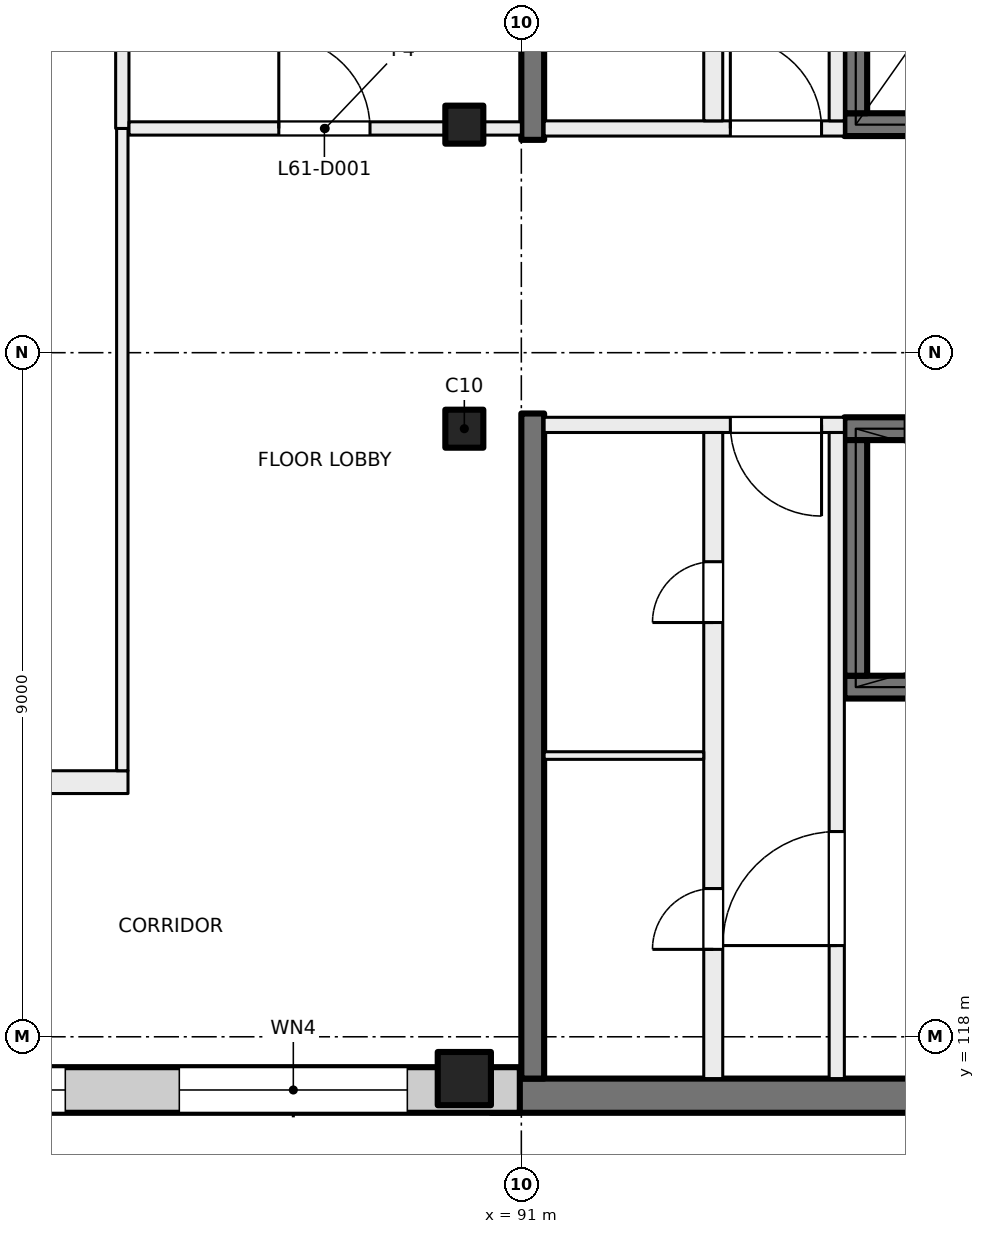
"""IFC4 building model, lengths in metres.
Left out: names, types, materials, properties, quantities, classifications, styles, units other than length and angle.
Written with IfcOpenShell. Run it as: python <this file> out.ifc"""

import sys

from ifc_helpers import new_model, si_unit, direction, frame, frame_2d, origin, origin_2d, place, context, subcontext, project, spatial, rectangle, extrude, element, fill, save


model = new_model("IFC4")
c1 = context("Model", 3, precision=1e-05, world=origin(), true_north=direction((0.0, 1.0)))
c2 = subcontext(c1, "Body", "Model", "MODEL_VIEW")
j1 = project(units=[si_unit("LENGTHUNIT", "METRE"), si_unit("PLANEANGLEUNIT", "RADIAN")], contexts=[c1])
p1 = place(None, origin())
s1 = spatial("IfcSite", under=j1, at=p1, CompositionType="ELEMENT")
p2 = place(p1, origin())
s2 = spatial("IfcBuilding", under=s1, at=p2, CompositionType="ELEMENT")
p3 = place(p2, frame((0.0, 0.0, 257.5)))
s3 = spatial("IfcBuildingStorey", under=s2, at=p3, CompositionType="ELEMENT", Elevation=257.5)
for number, where, z_axis, x_axis in (
    (1, (90.25, 130.0, 0.0), (0.0, 0.0, 1.0), (1.0, 0.0, 0.0)),
    (2, (90.25, 126.0, 0.0), (0.0, 0.0, 1.0), (1.0, 0.0, 0.0)),
):
    element("IfcColumn", number, at=place(p3, frame(where, z_axis=z_axis, x_axis=x_axis)), inside=s3, PredefinedType="COLUMN", context=c2, shape_type="SweptSolid", body=[
        extrude(rectangle(XDim=0.5, YDim=0.5, at=origin_2d()), origin(), (0.0, 0.0, 1.0), 4.0),
    ])
p4 = place(p3, frame((90.25, 117.45, 0.0), z_axis=(0.0, 0.0, 1.0), x_axis=(1.0, 0.0, 0.0)))
e3 = element("IfcColumn", 3, at=p4, inside=s3, PredefinedType="COLUMN", context=c2, shape_type="SweptSolid", body=[
    extrude(rectangle(XDim=0.7, YDim=0.7, at=origin_2d()), origin(), (0.0, 0.0, 1.0), 4.0),
])
p5 = place(p3, frame((99.6, 117.225, 0.0), z_axis=(0.0, 0.0, 1.0), x_axis=(-1.0, 0.0, 0.0)))
e4 = element("IfcWall", 4, at=p5, inside=s3, PredefinedType="SHEAR", context=c2, shape_type="SweptSolid", body=[
    extrude(rectangle(XDim=9.0, YDim=0.45, at=frame_2d((4.5, 0.0))), origin(), (0.0, 0.0, 1.0), 4.0),
])
p6 = place(p3, frame((107.55, 130.0, 0.0), z_axis=(0.0, 0.0, 1.0), x_axis=(-1.0, 0.0, 0.0)))
e5 = element("IfcWall", 5, at=p6, inside=s3, PredefinedType="SHEAR", context=c2, shape_type="SweptSolid", body=[
    extrude(rectangle(XDim=12.3, YDim=0.3, at=frame_2d((6.15, 0.0))), origin(), (0.0, 0.0, 1.0), 4.0),
])
p7 = place(p6, frame((0.95, 0.0, 0.0)))
e6 = element("IfcOpeningElement", 6, at=p7, cuts=e5, PredefinedType="OPENING", context=c2, shape_type="SweptSolid", body=[
    extrude(rectangle(XDim=0.8, YDim=2.1, at=frame_2d((0.4, 1.05))), frame((0.0, 0.16, 0.0), z_axis=(0.0, -1.0, 0.0), x_axis=(1.0, 0.0, 0.0)), (0.0, 0.0, 1.0), 0.32),
])
p8 = place(p6, frame((5.75, 0.0, 0.0)))
e7 = element("IfcOpeningElement", 7, at=p8, cuts=e5, PredefinedType="OPENING", context=c2, shape_type="SweptSolid", body=[
    extrude(rectangle(XDim=0.8, YDim=2.1, at=frame_2d((0.4, 1.05))), frame((0.0, 0.16, 0.0), z_axis=(0.0, -1.0, 0.0), x_axis=(1.0, 0.0, 0.0)), (0.0, 0.0, 1.0), 0.32),
])
p9 = place(p3, frame((95.4, 133.25, 0.0), z_axis=(0.0, 0.0, 1.0), x_axis=(0.0, -1.0, 0.0)))
e8 = element("IfcWall", 8, at=p9, inside=s3, PredefinedType="SHEAR", context=c2, shape_type="SweptSolid", body=[
    extrude(rectangle(XDim=3.1, YDim=0.3, at=frame_2d((1.55, 0.0))), origin(), (0.0, 0.0, 1.0), 4.0),
])
p10 = place(p3, frame((107.55, 126.0, 0.0), z_axis=(0.0, 0.0, 1.0), x_axis=(-1.0, 0.0, 0.0)))
e9 = element("IfcWall", 9, at=p10, inside=s3, PredefinedType="SHEAR", context=c2, shape_type="SweptSolid", body=[
    extrude(rectangle(XDim=12.3, YDim=0.3, at=frame_2d((6.15, 0.0))), origin(), (0.0, 0.0, 1.0), 4.0),
])
p11 = place(p10, frame((0.8, 0.0, 0.0)))
e10 = element("IfcOpeningElement", 10, at=p11, cuts=e9, PredefinedType="OPENING", context=c2, shape_type="SweptSolid", body=[
    extrude(rectangle(XDim=1.1, YDim=2.1, at=frame_2d((0.55, 1.05))), frame((0.0, 0.16, 0.0), z_axis=(0.0, -1.0, 0.0), x_axis=(1.0, 0.0, 0.0)), (0.0, 0.0, 1.0), 0.32),
])
p12 = place(p10, frame((3.2, 0.0, 0.0)))
e11 = element("IfcOpeningElement", 11, at=p12, cuts=e9, PredefinedType="OPENING", context=c2, shape_type="SweptSolid", body=[
    extrude(rectangle(XDim=1.1, YDim=2.1, at=frame_2d((0.55, 1.05))), frame((0.0, 0.16, 0.0), z_axis=(0.0, -1.0, 0.0), x_axis=(1.0, 0.0, 0.0)), (0.0, 0.0, 1.0), 0.32),
])
p13 = place(p10, frame((5.6, 0.0, 0.0)))
e12 = element("IfcOpeningElement", 12, at=p13, cuts=e9, PredefinedType="OPENING", context=c2, shape_type="SweptSolid", body=[
    extrude(rectangle(XDim=1.1, YDim=2.1, at=frame_2d((0.55, 1.05))), frame((0.0, 0.16, 0.0), z_axis=(0.0, -1.0, 0.0), x_axis=(1.0, 0.0, 0.0)), (0.0, 0.0, 1.0), 0.32),
])
p14 = place(p10, frame((10.4, 0.0, 0.0)))
e13 = element("IfcOpeningElement", 13, at=p14, cuts=e9, PredefinedType="OPENING", context=c2, shape_type="SweptSolid", body=[
    extrude(rectangle(XDim=1.1, YDim=2.1, at=frame_2d((0.55, 1.05))), frame((0.0, 0.16, 0.0), z_axis=(0.0, -1.0, 0.0), x_axis=(1.0, 0.0, 0.0)), (0.0, 0.0, 1.0), 0.32),
])
p15 = place(p3, frame((107.55, 122.6, 0.0), z_axis=(0.0, 0.0, 1.0), x_axis=(-1.0, 0.0, 0.0)))
e14 = element("IfcWall", 14, at=p15, inside=s3, PredefinedType="SHEAR", context=c2, shape_type="SweptSolid", body=[
    extrude(rectangle(XDim=12.3, YDim=0.3, at=frame_2d((6.15, 0.0))), origin(), (0.0, 0.0, 1.0), 4.0),
])
p16 = place(p15, frame((8.05, 0.0, 0.0)))
e15 = element("IfcOpeningElement", 15, at=p16, cuts=e14, PredefinedType="OPENING", context=c2, shape_type="SweptSolid", body=[
    extrude(rectangle(XDim=1.1, YDim=2.1, at=frame_2d((0.55, 1.05))), frame((0.0, 0.16, 0.0), z_axis=(0.0, -1.0, 0.0), x_axis=(1.0, 0.0, 0.0)), (0.0, 0.0, 1.0), 0.32),
])
p17 = place(p3, frame((95.4, 125.85, 0.0), z_axis=(0.0, 0.0, 1.0), x_axis=(0.0, -1.0, 0.0)))
e16 = element("IfcWall", 16, at=p17, inside=s3, PredefinedType="SHEAR", context=c2, shape_type="SweptSolid", body=[
    extrude(rectangle(XDim=3.1, YDim=0.3, at=frame_2d((1.55, 0.0))), origin(), (0.0, 0.0, 1.0), 4.0),
])
for number, where, z_axis, x_axis in (
    (17, (91.15, 138.55, 0.0), (0.0, 0.0, 1.0), (0.0, -1.0, 0.0)),
    (18, (91.15, 126.2, 0.0), (0.0, 0.0, 1.0), (0.0, -1.0, 0.0)),
):
    element("IfcWall", number, at=place(p3, frame(where, z_axis=z_axis, x_axis=x_axis)), inside=s3, PredefinedType="SHEAR", context=c2, shape_type="SweptSolid", body=[
        extrude(rectangle(XDim=8.75, YDim=0.3, at=frame_2d((4.375, 0.0))), origin(), (0.0, 0.0, 1.0), 4.0),
    ])
p18 = place(p3, frame((90.98, 117.3, 0.0), z_axis=(0.0, 0.0, 1.0), x_axis=(-1.0, 0.0, 0.0)))
e19 = element("IfcWall", 19, at=p18, inside=s3, PredefinedType="SOLIDWALL", context=c2, shape_type="SweptSolid", body=[
    extrude(rectangle(XDim=43.98, YDim=0.6, at=frame_2d((21.99, 0.0))), origin(), (0.0, 0.0, 1.0), 3.625),
])
p19 = place(p18, frame((1.48, 0.0, 0.9)))
e20 = element("IfcOpeningElement", 20, at=p19, cuts=e19, PredefinedType="OPENING", context=c2, shape_type="SweptSolid", body=[
    extrude(rectangle(XDim=3.0, YDim=2.4, at=frame_2d((1.5, 1.2))), frame((0.0, 0.31, 0.0), z_axis=(0.0, -1.0, 0.0), x_axis=(1.0, 0.0, 0.0)), (0.0, 0.0, 1.0), 0.62),
])
p20 = place(p18, frame((5.98, 0.0, 0.9)))
e21 = element("IfcOpeningElement", 21, at=p20, cuts=e19, PredefinedType="OPENING", context=c2, shape_type="SweptSolid", body=[
    extrude(rectangle(XDim=3.0, YDim=2.4, at=frame_2d((1.5, 1.2))), frame((0.0, 0.31, 0.0), z_axis=(0.0, -1.0, 0.0), x_axis=(1.0, 0.0, 0.0)), (0.0, 0.0, 1.0), 0.62),
])
p21 = place(p18, frame((10.48, 0.0, 0.9)))
e22 = element("IfcOpeningElement", 22, at=p21, cuts=e19, PredefinedType="OPENING", context=c2, shape_type="SweptSolid", body=[
    extrude(rectangle(XDim=3.0, YDim=2.4, at=frame_2d((1.5, 1.2))), frame((0.0, 0.31, 0.0), z_axis=(0.0, -1.0, 0.0), x_axis=(1.0, 0.0, 0.0)), (0.0, 0.0, 1.0), 0.62),
])
p22 = place(p18, frame((14.98, 0.0, 0.9)))
e23 = element("IfcOpeningElement", 23, at=p22, cuts=e19, PredefinedType="OPENING", context=c2, shape_type="SweptSolid", body=[
    extrude(rectangle(XDim=3.0, YDim=2.4, at=frame_2d((1.5, 1.2))), frame((0.0, 0.31, 0.0), z_axis=(0.0, -1.0, 0.0), x_axis=(1.0, 0.0, 0.0)), (0.0, 0.0, 1.0), 0.62),
])
p23 = place(p18, frame((19.48, 0.0, 0.9)))
e24 = element("IfcOpeningElement", 24, at=p23, cuts=e19, PredefinedType="OPENING", context=c2, shape_type="SweptSolid", body=[
    extrude(rectangle(XDim=3.0, YDim=2.4, at=frame_2d((1.5, 1.2))), frame((0.0, 0.31, 0.0), z_axis=(0.0, -1.0, 0.0), x_axis=(1.0, 0.0, 0.0)), (0.0, 0.0, 1.0), 0.62),
])
p24 = place(p18, frame((23.98, 0.0, 0.9)))
e25 = element("IfcOpeningElement", 25, at=p24, cuts=e19, PredefinedType="OPENING", context=c2, shape_type="SweptSolid", body=[
    extrude(rectangle(XDim=3.0, YDim=2.4, at=frame_2d((1.5, 1.2))), frame((0.0, 0.31, 0.0), z_axis=(0.0, -1.0, 0.0), x_axis=(1.0, 0.0, 0.0)), (0.0, 0.0, 1.0), 0.62),
])
p25 = place(p18, frame((28.48, 0.0, 0.9)))
e26 = element("IfcOpeningElement", 26, at=p25, cuts=e19, PredefinedType="OPENING", context=c2, shape_type="SweptSolid", body=[
    extrude(rectangle(XDim=3.0, YDim=2.4, at=frame_2d((1.5, 1.2))), frame((0.0, 0.31, 0.0), z_axis=(0.0, -1.0, 0.0), x_axis=(1.0, 0.0, 0.0)), (0.0, 0.0, 1.0), 0.62),
])
p26 = place(p18, frame((32.98, 0.0, 0.9)))
e27 = element("IfcOpeningElement", 27, at=p26, cuts=e19, PredefinedType="OPENING", context=c2, shape_type="SweptSolid", body=[
    extrude(rectangle(XDim=3.0, YDim=2.4, at=frame_2d((1.5, 1.2))), frame((0.0, 0.31, 0.0), z_axis=(0.0, -1.0, 0.0), x_axis=(1.0, 0.0, 0.0)), (0.0, 0.0, 1.0), 0.62),
])
p27 = place(p18, frame((37.48, 0.0, 0.9)))
e28 = element("IfcOpeningElement", 28, at=p27, cuts=e19, PredefinedType="OPENING", context=c2, shape_type="SweptSolid", body=[
    extrude(rectangle(XDim=3.0, YDim=2.4, at=frame_2d((1.5, 1.2))), frame((0.0, 0.31, 0.0), z_axis=(0.0, -1.0, 0.0), x_axis=(1.0, 0.0, 0.0)), (0.0, 0.0, 1.0), 0.62),
])
p28 = place(p3, frame((95.25, 126.05, 0.0), z_axis=(0.0, 0.0, 1.0), x_axis=(-1.0, 0.0, 0.0)))
e29 = element("IfcWall", 29, at=p28, inside=s3, PredefinedType="PARTITIONING", context=c2, shape_type="SweptSolid", body=[
    extrude(rectangle(XDim=3.95, YDim=0.2, at=frame_2d((1.975, 0.0))), origin(), (0.0, 0.0, 1.0), 3.625),
])
p29 = place(p28, frame((0.3, 0.0, 0.0)))
e30 = element("IfcOpeningElement", 30, at=p29, cuts=e29, PredefinedType="OPENING", context=c2, shape_type="SweptSolid", body=[
    extrude(rectangle(XDim=1.2, YDim=2.1, at=frame_2d((0.6, 1.05))), frame((0.0, 0.11, 0.0), z_axis=(0.0, -1.0, 0.0), x_axis=(1.0, 0.0, 0.0)), (0.0, 0.0, 1.0), 0.22),
])
p30 = place(p3, frame((95.15, 117.45, 0.0), z_axis=(0.0, 0.0, 1.0), x_axis=(0.0, 1.0, 0.0)))
e31 = element("IfcWall", 31, at=p30, inside=s3, PredefinedType="PARTITIONING", context=c2, shape_type="SweptSolid", body=[
    extrude(rectangle(XDim=8.5, YDim=0.2, at=frame_2d((4.25, 0.0))), origin(), (0.0, 0.0, 1.0), 3.625),
])
p31 = place(p30, frame((1.75, 0.0, 0.0)))
e32 = element("IfcOpeningElement", 32, at=p31, cuts=e31, PredefinedType="OPENING", context=c2, shape_type="SweptSolid", body=[
    extrude(rectangle(XDim=1.5, YDim=2.1, at=frame_2d((0.75, 1.05))), frame((0.0, 0.11, 0.0), z_axis=(0.0, -1.0, 0.0), x_axis=(1.0, 0.0, 0.0)), (0.0, 0.0, 1.0), 0.22),
])
p32 = place(p3, frame((93.525, 117.45, 0.0), z_axis=(0.0, 0.0, 1.0), x_axis=(0.0, 1.0, 0.0)))
e33 = element("IfcWall", 33, at=p32, inside=s3, PredefinedType="PARTITIONING", context=c2, shape_type="SweptSolid", body=[
    extrude(rectangle(XDim=8.5, YDim=0.25, at=frame_2d((4.25, 0.0))), origin(), (0.0, 0.0, 1.0), 3.625),
])
p33 = place(p32, frame((6.0, 0.0, 0.0)))
e34 = element("IfcOpeningElement", 34, at=p33, cuts=e33, PredefinedType="OPENING", context=c2, shape_type="SweptSolid", body=[
    extrude(rectangle(XDim=0.8, YDim=2.1, at=frame_2d((0.4, 1.05))), frame((0.0, 0.135, 0.0), z_axis=(0.0, -1.0, 0.0), x_axis=(1.0, 0.0, 0.0)), (0.0, 0.0, 1.0), 0.27),
])
p34 = place(p32, frame((1.7, 0.0, 0.0)))
e35 = element("IfcOpeningElement", 35, at=p34, cuts=e33, PredefinedType="OPENING", context=c2, shape_type="SweptSolid", body=[
    extrude(rectangle(XDim=0.8, YDim=2.1, at=frame_2d((0.4, 1.05))), frame((0.0, 0.135, 0.0), z_axis=(0.0, -1.0, 0.0), x_axis=(1.0, 0.0, 0.0)), (0.0, 0.0, 1.0), 0.27),
])
p35 = place(p3, frame((93.4, 121.7, 0.0), z_axis=(0.0, 0.0, 1.0), x_axis=(-1.0, 0.0, 0.0)))
e36 = element("IfcWall", 36, at=p35, inside=s3, PredefinedType="PARTITIONING", context=c2, shape_type="SweptSolid", body=[
    extrude(rectangle(XDim=2.1, YDim=0.1, at=frame_2d((1.05, 0.0))), origin(), (0.0, 0.0, 1.0), 3.625),
])
p36 = place(p3, frame((91.3, 129.95, 0.0), z_axis=(0.0, 0.0, 1.0), x_axis=(1.0, 0.0, 0.0)))
e37 = element("IfcWall", 37, at=p36, inside=s3, PredefinedType="PARTITIONING", context=c2, shape_type="SweptSolid", body=[
    extrude(rectangle(XDim=3.95, YDim=0.2, at=frame_2d((1.975, 0.0))), origin(), (0.0, 0.0, 1.0), 3.625),
])
p37 = place(p36, frame((2.45, 0.0, 0.0)))
e38 = element("IfcOpeningElement", 38, at=p37, cuts=e37, PredefinedType="OPENING", context=c2, shape_type="SweptSolid", body=[
    extrude(rectangle(XDim=1.2, YDim=2.1, at=frame_2d((0.6, 1.05))), frame((0.0, 0.11, 0.0), z_axis=(0.0, -1.0, 0.0), x_axis=(1.0, 0.0, 0.0)), (0.0, 0.0, 1.0), 0.22),
])
p38 = place(p3, frame((95.15, 130.05, 0.0), z_axis=(0.0, 0.0, 1.0), x_axis=(0.0, 1.0, 0.0)))
e39 = element("IfcWall", 39, at=p38, inside=s3, PredefinedType="PARTITIONING", context=c2, shape_type="SweptSolid", body=[
    extrude(rectangle(XDim=8.5, YDim=0.2, at=frame_2d((4.25, 0.0))), origin(), (0.0, 0.0, 1.0), 3.625),
])
p39 = place(p38, frame((5.25, 0.0, 0.0)))
e40 = element("IfcOpeningElement", 40, at=p39, cuts=e39, PredefinedType="OPENING", context=c2, shape_type="SweptSolid", body=[
    extrude(rectangle(XDim=1.5, YDim=2.1, at=frame_2d((0.75, 1.05))), frame((0.0, 0.11, 0.0), z_axis=(0.0, -1.0, 0.0), x_axis=(1.0, 0.0, 0.0)), (0.0, 0.0, 1.0), 0.22),
])
p40 = place(p3, frame((93.525, 130.05, 0.0), z_axis=(0.0, 0.0, 1.0), x_axis=(0.0, 1.0, 0.0)))
e41 = element("IfcWall", 41, at=p40, inside=s3, PredefinedType="PARTITIONING", context=c2, shape_type="SweptSolid", body=[
    extrude(rectangle(XDim=8.5, YDim=0.25, at=frame_2d((4.25, 0.0))), origin(), (0.0, 0.0, 1.0), 3.625),
])
p41 = place(p40, frame((3.85, 0.0, 0.0)))
e42 = element("IfcOpeningElement", 42, at=p41, cuts=e41, PredefinedType="OPENING", context=c2, shape_type="SweptSolid", body=[
    extrude(rectangle(XDim=0.8, YDim=2.1, at=frame_2d((0.4, 1.05))), frame((0.0, 0.135, 0.0), z_axis=(0.0, -1.0, 0.0), x_axis=(1.0, 0.0, 0.0)), (0.0, 0.0, 1.0), 0.27),
])
p42 = place(p3, frame((54.4, 121.35, 0.0), z_axis=(0.0, 0.0, 1.0), x_axis=(1.0, 0.0, 0.0)))
e43 = element("IfcWall", 43, at=p42, inside=s3, PredefinedType="PARTITIONING", context=c2, shape_type="SweptSolid", body=[
    extrude(rectangle(XDim=31.425, YDim=0.3, at=frame_2d((15.712, 0.0))), origin(), (0.0, 0.0, 1.0), 3.625),
])
p43 = place(p42, frame((18.95, 0.0, 0.0)))
e44 = element("IfcOpeningElement", 44, at=p43, cuts=e43, PredefinedType="OPENING", context=c2, shape_type="SweptSolid", body=[
    extrude(rectangle(XDim=0.8, YDim=2.1, at=frame_2d((0.4, 1.05))), frame((0.0, 0.16, 0.0), z_axis=(0.0, -1.0, 0.0), x_axis=(1.0, 0.0, 0.0)), (0.0, 0.0, 1.0), 0.32),
])
p44 = place(p42, frame((25.2, 0.0, 0.0)))
e45 = element("IfcOpeningElement", 45, at=p44, cuts=e43, PredefinedType="OPENING", context=c2, shape_type="SweptSolid", body=[
    extrude(rectangle(XDim=1.8, YDim=2.1, at=frame_2d((0.9, 1.05))), frame((0.0, 0.16, 0.0), z_axis=(0.0, -1.0, 0.0), x_axis=(1.0, 0.0, 0.0)), (0.0, 0.0, 1.0), 0.32),
])
p45 = place(p42, frame((12.85, 0.0, 0.0)))
e46 = element("IfcOpeningElement", 46, at=p45, cuts=e43, PredefinedType="OPENING", context=c2, shape_type="SweptSolid", body=[
    extrude(rectangle(XDim=1.0, YDim=2.1, at=frame_2d((0.5, 1.05))), frame((0.0, 0.16, 0.0), z_axis=(0.0, -1.0, 0.0), x_axis=(1.0, 0.0, 0.0)), (0.0, 0.0, 1.0), 0.32),
])
p46 = place(p42, frame((3.515, 0.0, 0.0)))
e47 = element("IfcOpeningElement", 47, at=p46, cuts=e43, PredefinedType="OPENING", context=c2, shape_type="SweptSolid", body=[
    extrude(rectangle(XDim=1.8, YDim=2.1, at=frame_2d((0.9, 1.05))), frame((0.0, 0.16, 0.0), z_axis=(0.0, -1.0, 0.0), x_axis=(1.0, 0.0, 0.0)), (0.0, 0.0, 1.0), 0.32),
])
p47 = place(p3, frame((85.75, 121.5, 0.0), z_axis=(0.0, 0.0, 1.0), x_axis=(0.0, 1.0, 0.0)))
e48 = element("IfcWall", 48, at=p47, inside=s3, PredefinedType="PARTITIONING", context=c2, shape_type="SweptSolid", body=[
    extrude(rectangle(XDim=8.45, YDim=0.15, at=frame_2d((4.225, 0.0))), origin(), (0.0, 0.0, 1.0), 3.625),
])
p48 = place(p3, frame((85.75, 129.95, 0.0), z_axis=(0.0, 0.0, 1.0), x_axis=(0.0, 1.0, 0.0)))
e49 = element("IfcWall", 49, at=p48, inside=s3, PredefinedType="PARTITIONING", context=c2, shape_type="SweptSolid", body=[
    extrude(rectangle(XDim=8.45, YDim=0.175, at=frame_2d((4.225, 0.0))), origin(), (0.0, 0.0, 1.0), 3.625),
])
p49 = place(p3, frame((85.838, 129.95, 0.0), z_axis=(0.0, 0.0, 1.0), x_axis=(1.0, 0.0, 0.0)))
e50 = element("IfcWall", 50, at=p49, inside=s3, PredefinedType="PARTITIONING", context=c2, shape_type="SweptSolid", body=[
    extrude(rectangle(XDim=5.162, YDim=0.175, at=frame_2d((2.581, 0.0))), origin(), (0.0, 0.0, 1.0), 3.625),
])
p50 = place(p49, frame((1.971, 0.0, 0.0)))
e51 = element("IfcOpeningElement", 51, at=p50, cuts=e50, PredefinedType="OPENING", context=c2, shape_type="SweptSolid", body=[
    extrude(rectangle(XDim=1.2, YDim=2.1, at=frame_2d((0.6, 1.05))), frame((0.0, 0.097, 0.0), z_axis=(0.0, -1.0, 0.0), x_axis=(1.0, 0.0, 0.0)), (0.0, 0.0, 1.0), 0.195),
])
p51 = place(p19, origin())
e52 = element("IfcWindow", 52, at=p51, inside=s3, PartitioningType="SINGLE_PANEL", PredefinedType="WINDOW", context=c2, shape_type="SweptSolid", body=[
    extrude(rectangle(XDim=3.0, YDim=2.4, at=frame_2d((1.5, 1.2))), frame((0.0, 0.03, 0.0), z_axis=(0.0, -1.0, 0.0), x_axis=(1.0, 0.0, 0.0)), (0.0, 0.0, 1.0), 0.06),
])
fill(e20, e52)
p52 = place(p20, origin())
e53 = element("IfcWindow", 53, at=p52, inside=s3, PartitioningType="SINGLE_PANEL", PredefinedType="WINDOW", context=c2, shape_type="SweptSolid", body=[
    extrude(rectangle(XDim=3.0, YDim=2.4, at=frame_2d((1.5, 1.2))), frame((0.0, 0.03, 0.0), z_axis=(0.0, -1.0, 0.0), x_axis=(1.0, 0.0, 0.0)), (0.0, 0.0, 1.0), 0.06),
])
fill(e21, e53)
p53 = place(p29, origin())
e54 = element("IfcDoor", 54, at=p53, inside=s3, OperationType="DOUBLE_DOOR_SINGLE_SWING", PredefinedType="DOOR", context=c2, shape_type="SweptSolid", body=[
    extrude(rectangle(XDim=1.2, YDim=2.1, at=frame_2d((0.6, 1.05))), frame((0.0, 0.025, 0.0), z_axis=(0.0, -1.0, 0.0), x_axis=(1.0, 0.0, 0.0)), (0.0, 0.0, 1.0), 0.05),
])
fill(e30, e54)
p54 = place(p31, origin())
e55 = element("IfcDoor", 55, at=p54, inside=s3, OperationType="DOUBLE_DOOR_SINGLE_SWING", PredefinedType="DOOR", context=c2, shape_type="SweptSolid", body=[
    extrude(rectangle(XDim=1.5, YDim=2.1, at=frame_2d((0.75, 1.05))), frame((0.0, 0.025, 0.0), z_axis=(0.0, -1.0, 0.0), x_axis=(1.0, 0.0, 0.0)), (0.0, 0.0, 1.0), 0.05),
])
fill(e32, e55)
p55 = place(p33, origin())
e56 = element("IfcDoor", 56, at=p55, inside=s3, OperationType="SINGLE_SWING_LEFT", PredefinedType="DOOR", context=c2, shape_type="SweptSolid", body=[
    extrude(rectangle(XDim=0.8, YDim=2.1, at=frame_2d((0.4, 1.05))), frame((0.0, 0.025, 0.0), z_axis=(0.0, -1.0, 0.0), x_axis=(1.0, 0.0, 0.0)), (0.0, 0.0, 1.0), 0.05),
])
fill(e34, e56)
p56 = place(p34, origin())
e57 = element("IfcDoor", 57, at=p56, inside=s3, OperationType="SINGLE_SWING_RIGHT", PredefinedType="DOOR", context=c2, shape_type="SweptSolid", body=[
    extrude(rectangle(XDim=0.8, YDim=2.1, at=frame_2d((0.4, 1.05))), frame((0.0, 0.025, 0.0), z_axis=(0.0, -1.0, 0.0), x_axis=(1.0, 0.0, 0.0)), (0.0, 0.0, 1.0), 0.05),
])
fill(e35, e57)
p57 = place(p37, origin())
e58 = element("IfcDoor", 58, at=p57, inside=s3, OperationType="DOUBLE_DOOR_SINGLE_SWING", PredefinedType="DOOR", context=c2, shape_type="SweptSolid", body=[
    extrude(rectangle(XDim=1.2, YDim=2.1, at=frame_2d((0.6, 1.05))), frame((0.0, 0.025, 0.0), z_axis=(0.0, -1.0, 0.0), x_axis=(1.0, 0.0, 0.0)), (0.0, 0.0, 1.0), 0.05),
])
fill(e38, e58)
p58 = place(p50, origin())
e59 = element("IfcDoor", 59, at=p58, inside=s3, OperationType="DOUBLE_DOOR_SINGLE_SWING", PredefinedType="DOOR", context=c2, shape_type="SweptSolid", body=[
    extrude(rectangle(XDim=1.2, YDim=2.1, at=frame_2d((0.6, 1.05))), frame((0.0, 0.025, 0.0), z_axis=(0.0, -1.0, 0.0), x_axis=(1.0, 0.0, 0.0)), (0.0, 0.0, 1.0), 0.05),
])
fill(e51, e59)
save(model, sys.argv[1])
